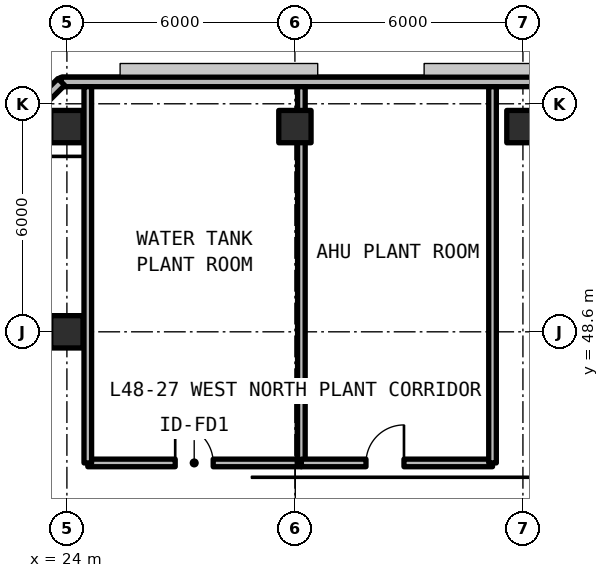
"""IFC4 building model, lengths in metres.
Left out: names, types, materials, properties, quantities, classifications, styles, units other than length and angle.
Written with IfcOpenShell. Run it as: python <this file> out.ifc"""

import sys

from ifc_helpers import new_model, si_unit, direction, frame, frame_2d, origin, origin_2d, place, context, subcontext, project, spatial, rectangle, extrude, element, fill, save


model = new_model("IFC4")
c1 = context("Model", 3, precision=1e-05, world=origin(), true_north=direction((0.0, 1.0)))
c2 = subcontext(c1, "Body", "Model", "MODEL_VIEW")
j1 = project(units=[si_unit("LENGTHUNIT", "METRE"), si_unit("PLANEANGLEUNIT", "RADIAN")], contexts=[c1])
p1 = place(None, origin())
s1 = spatial("IfcSite", under=j1, at=p1, CompositionType="ELEMENT")
p2 = place(p1, origin())
s2 = spatial("IfcBuilding", under=s1, at=p2, CompositionType="ELEMENT")
p3 = place(p2, frame((0.0, 0.0, 172.92)))
s3 = spatial("IfcBuildingStorey", under=s2, at=p3, CompositionType="ELEMENT", Elevation=172.92)
p4 = place(p3, frame((24.0, 48.6, 0.0), z_axis=(0.0, 0.0, 1.0), x_axis=(1.0, 0.0, 0.0)))
e1 = element("IfcColumn", 1, at=p4, inside=s3, PredefinedType="COLUMN", context=c2, shape_type="SweptSolid", body=[
    extrude(rectangle(XDim=0.85, YDim=0.85, at=origin_2d()), origin(), (0.0, 0.0, 1.0), 4.95),
])
for number, where, z_axis, x_axis in (
    (2, (24.0, 54.0, 0.0), (0.0, 0.0, 1.0), (1.0, 0.0, 0.0)),
    (3, (30.0, 54.0, 0.0), (0.0, 0.0, 1.0), (1.0, 0.0, 0.0)),
    (4, (36.0, 54.0, 0.0), (0.0, 0.0, 1.0), (1.0, 0.0, 0.0)),
):
    element("IfcColumn", number, at=place(p3, frame(where, z_axis=z_axis, x_axis=x_axis)), inside=s3, PredefinedType="COLUMN", context=c2, shape_type="SweptSolid", body=[
        extrude(rectangle(XDim=0.85, YDim=0.85, at=origin_2d()), origin(), (0.0, 0.0, 1.0), 4.67),
    ])
p5 = place(p3, frame((39.075, 55.175, 0.0), z_axis=(0.0, 0.0, 1.0), x_axis=(-1.0, 0.0, 0.0)))
e5 = element("IfcWall", 5, at=p5, inside=s3, PredefinedType="SOLIDWALL", context=c2, shape_type="SweptSolid", body=[
    extrude(rectangle(XDim=15.223, YDim=0.25, at=frame_2d((7.612, 0.0))), origin(), (0.0, 0.0, 1.0), 4.67),
])
p6 = place(p3, frame((23.852, 55.175, 0.0), z_axis=(0.0, 0.0, 1.0), x_axis=(-0.70708586489, -0.707127696864, 0.0)))
e6 = element("IfcWall", 6, at=p6, inside=s3, PredefinedType="SOLIDWALL", context=c2, shape_type="SweptSolid", body=[
    extrude(rectangle(XDim=5.836, YDim=0.25, at=frame_2d((2.918, 0.0))), origin(), (0.0, 0.0, 1.0), 4.67),
])
p7 = place(p3, frame((24.55, 45.15, 0.0), z_axis=(0.0, 0.0, 1.0), x_axis=(1.0, 0.0, 0.0)))
e7 = element("IfcWall", 7, at=p7, inside=s3, PredefinedType="SOLIDWALL", context=c2, shape_type="SweptSolid", body=[
    extrude(rectangle(XDim=5.62, YDim=0.2, at=frame_2d((2.81, 0.0))), origin(), (0.0, 0.0, 1.0), 3.89),
])
p8 = place(p7, frame((2.3, 0.0, 0.0)))
e8 = element("IfcOpeningElement", 8, at=p8, cuts=e7, PredefinedType="OPENING", context=c2, shape_type="SweptSolid", body=[
    extrude(rectangle(XDim=1.0, YDim=2.15, at=frame_2d((0.5, 1.075))), frame((0.0, 0.11, 0.0), z_axis=(0.0, -1.0, 0.0), x_axis=(1.0, 0.0, 0.0)), (0.0, 0.0, 1.0), 0.22),
])
p9 = place(p3, frame((24.55, 45.15, 0.0), z_axis=(0.0, 0.0, 1.0), x_axis=(0.0, 1.0, 0.0)))
e9 = element("IfcWall", 9, at=p9, inside=s3, PredefinedType="SOLIDWALL", context=c2, shape_type="SweptSolid", body=[
    extrude(rectangle(XDim=9.9, YDim=0.2, at=frame_2d((4.95, 0.0))), origin(), (0.0, 0.0, 1.0), 3.89),
])
p10 = place(p3, frame((30.17, 45.15, 0.0), z_axis=(0.0, 0.0, 1.0), x_axis=(0.0, 1.0, 0.0)))
e10 = element("IfcWall", 10, at=p10, inside=s3, PredefinedType="SOLIDWALL", context=c2, shape_type="SweptSolid", body=[
    extrude(rectangle(XDim=9.9, YDim=0.2, at=frame_2d((4.95, 0.0))), origin(), (0.0, 0.0, 1.0), 3.647),
])
p11 = place(p3, frame((30.17, 45.15, 0.0), z_axis=(0.0, 0.0, 1.0), x_axis=(1.0, 0.0, 0.0)))
e11 = element("IfcWall", 11, at=p11, inside=s3, PredefinedType="SOLIDWALL", context=c2, shape_type="SweptSolid", body=[
    extrude(rectangle(XDim=5.03, YDim=0.2, at=frame_2d((2.515, 0.0))), origin(), (0.0, 0.0, 1.0), 3.89),
])
p12 = place(p11, frame((1.7, 0.0, 0.0)))
e12 = element("IfcOpeningElement", 12, at=p12, cuts=e11, PredefinedType="OPENING", context=c2, shape_type="SweptSolid", body=[
    extrude(rectangle(XDim=1.0, YDim=2.15, at=frame_2d((0.5, 1.075))), frame((0.0, 0.11, 0.0), z_axis=(0.0, -1.0, 0.0), x_axis=(1.0, 0.0, 0.0)), (0.0, 0.0, 1.0), 0.22),
])
p13 = place(p3, frame((35.2, 45.15, 0.0), z_axis=(0.0, 0.0, 1.0), x_axis=(0.0, 1.0, 0.0)))
e13 = element("IfcWall", 13, at=p13, inside=s3, PredefinedType="SOLIDWALL", context=c2, shape_type="SweptSolid", body=[
    extrude(rectangle(XDim=9.9, YDim=0.2, at=frame_2d((4.95, 0.0))), origin(), (0.0, 0.0, 1.0), 3.89),
])
p14 = place(p8, origin())
e14 = element("IfcDoor", 14, at=p14, inside=s3, OperationType="SINGLE_SWING_LEFT", PredefinedType="DOOR", context=c2, shape_type="SweptSolid", body=[
    extrude(rectangle(XDim=1.0, YDim=2.15, at=frame_2d((0.5, 1.075))), frame((0.0, 0.025, 0.0), z_axis=(0.0, -1.0, 0.0), x_axis=(1.0, 0.0, 0.0)), (0.0, 0.0, 1.0), 0.05),
])
fill(e8, e14)
p15 = place(p12, origin())
e15 = element("IfcDoor", 15, at=p15, inside=s3, OperationType="SINGLE_SWING_RIGHT", PredefinedType="DOOR", context=c2, shape_type="SweptSolid", body=[
    extrude(rectangle(XDim=1.0, YDim=2.15, at=frame_2d((0.5, 1.075))), frame((0.0, 0.025, 0.0), z_axis=(0.0, -1.0, 0.0), x_axis=(1.0, 0.0, 0.0)), (0.0, 0.0, 1.0), 0.05),
])
fill(e12, e15)
save(model, sys.argv[1])
